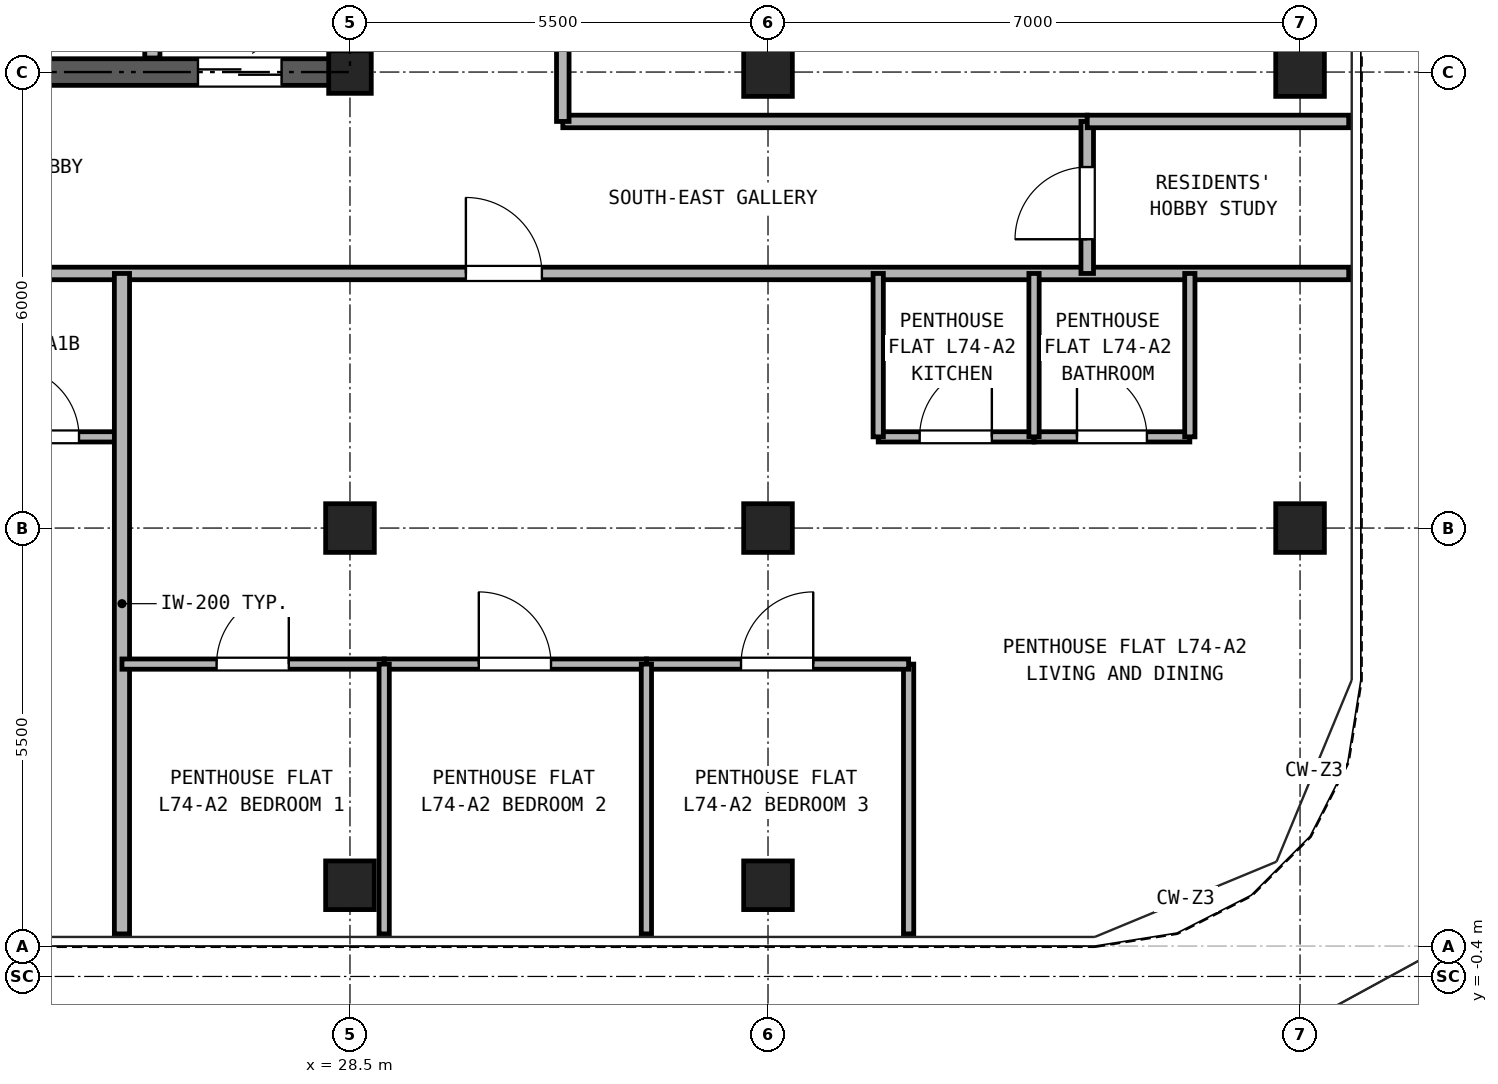
"""IFC4 building model, lengths in metres.
Left out: names, types, materials, properties, quantities, classifications, styles, units other than length and angle.
Written with IfcOpenShell. Run it as: python <this file> out.ifc"""

import sys

from ifc_helpers import new_model, si_unit, direction, frame, frame_2d, origin, origin_2d, place, context, subcontext, project, spatial, rectangle, hollow_rectangle, extrude, source, transform, mapped, element, fill, save


model = new_model("IFC4")
c1 = context("Model", 3, precision=1e-05, world=origin(), true_north=direction((0.0, 1.0)))
c2 = subcontext(c1, "Body", "Model", "MODEL_VIEW")
j1 = project(units=[si_unit("LENGTHUNIT", "METRE"), si_unit("PLANEANGLEUNIT", "RADIAN")], contexts=[c1])
p1 = place(None, origin())
s1 = spatial("IfcSite", under=j1, at=p1, CompositionType="ELEMENT")
p2 = place(p1, origin())
s2 = spatial("IfcBuilding", under=s1, at=p2, CompositionType="ELEMENT")
p3 = place(p2, frame((0.0, 0.0, 258.5)))
s3 = spatial("IfcBuildingStorey", under=s2, at=p3, CompositionType="ELEMENT", Elevation=258.5)
m1 = source(origin(), c2, "Body", "SweptSolid", [
    extrude(hollow_rectangle(XDim=0.64, YDim=0.64, WallThickness=0.035, at=origin_2d()), origin(), (0.0, 0.0, 1.0), 2.98),
])
for number, where, z_axis, x_axis in (
    (1, (28.5, 0.8, 0.0), (0.0, 0.0, 1.0), (1.0, 0.0, 0.0)),
    (2, (34.0, 0.8, 0.0), (0.0, 0.0, 1.0), (1.0, 0.0, 0.0)),
    (3, (41.0, 5.5, 0.0), (0.0, 0.0, 1.0), (1.0, 0.0, 0.0)),
    (4, (41.0, 11.5, 0.0), (0.0, 0.0, 1.0), (1.0, 0.0, 0.0)),
    (5, (28.5, 5.5, 0.0), (0.0, 0.0, 1.0), (1.0, 0.0, 0.0)),
):
    element("IfcColumn", number, at=place(p3, frame(where, z_axis=z_axis, x_axis=x_axis)), inside=s3, PredefinedType="COLUMN", context=c2, shape_type="MappedRepresentation", body=[
        mapped(m1, transform((0.0, 0.0, 0.0), x_axis=(1.0, 0.0, 0.0), y_axis=(0.0, 1.0, 0.0), z_axis=(0.0, 0.0, 1.0), scale=1.0)),
    ])
m2 = source(origin(), c2, "Body", "SweptSolid", [
    extrude(hollow_rectangle(XDim=0.56, YDim=0.56, WallThickness=0.03, at=origin_2d()), origin(), (0.0, 0.0, 1.0), 2.98),
])
p4 = place(p3, frame((28.5, 11.5, 0.0), z_axis=(0.0, 0.0, 1.0), x_axis=(1.0, 0.0, 0.0)))
e6 = element("IfcColumn", 6, at=p4, inside=s3, PredefinedType="COLUMN", context=c2, shape_type="MappedRepresentation", body=[
    mapped(m2, transform((0.0, 0.0, 0.0), x_axis=(1.0, 0.0, 0.0), y_axis=(0.0, 1.0, 0.0), z_axis=(0.0, 0.0, 1.0), scale=1.0)),
])
for number, where, z_axis, x_axis in (
    (7, (34.0, 5.5, 0.0), (0.0, 0.0, 1.0), (1.0, 0.0, 0.0)),
    (8, (34.0, 11.5, 0.0), (0.0, 0.0, 1.0), (1.0, 0.0, 0.0)),
):
    element("IfcColumn", number, at=place(p3, frame(where, z_axis=z_axis, x_axis=x_axis)), inside=s3, PredefinedType="COLUMN", context=c2, shape_type="MappedRepresentation", body=[
        mapped(m1, transform((0.0, 0.0, 0.0), x_axis=(1.0, 0.0, 0.0), y_axis=(0.0, 1.0, 0.0), z_axis=(0.0, 0.0, 1.0), scale=1.0)),
    ])
p5 = place(p3, frame((18.325, 11.5, 0.0), z_axis=(0.0, 0.0, 1.0), x_axis=(1.0, 0.0, 0.0)))
e9 = element("IfcWall", 9, at=p5, inside=s3, PredefinedType="SHEAR", context=c2, shape_type="SweptSolid", body=[
    extrude(rectangle(XDim=10.35, YDim=0.35, at=frame_2d((5.175, 0.0))), origin(), (0.0, 0.0, 1.0), 2.98),
])
p6 = place(p5, frame((1.775, 0.0, 0.0)))
e10 = element("IfcOpeningElement", 10, at=p6, cuts=e9, PredefinedType="OPENING", context=c2, shape_type="SweptSolid", body=[
    extrude(rectangle(XDim=0.95, YDim=2.15, at=frame_2d((0.475, 1.075))), frame((0.0, 0.185, 0.0), z_axis=(0.0, -1.0, 0.0), x_axis=(1.0, 0.0, 0.0)), (0.0, 0.0, 1.0), 0.37),
])
p7 = place(p5, frame((5.275, 0.0, 0.0)))
e11 = element("IfcOpeningElement", 11, at=p7, cuts=e9, PredefinedType="OPENING", context=c2, shape_type="SweptSolid", body=[
    extrude(rectangle(XDim=0.95, YDim=2.15, at=frame_2d((0.475, 1.075))), frame((0.0, 0.185, 0.0), z_axis=(0.0, -1.0, 0.0), x_axis=(1.0, 0.0, 0.0)), (0.0, 0.0, 1.0), 0.37),
])
p8 = place(p5, frame((8.175, 0.0, 0.0)))
e12 = element("IfcOpeningElement", 12, at=p8, cuts=e9, PredefinedType="OPENING", context=c2, shape_type="SweptSolid", body=[
    extrude(rectangle(XDim=1.1, YDim=2.25, at=frame_2d((0.55, 1.125))), frame((0.0, 0.185, 0.0), z_axis=(0.0, -1.0, 0.0), x_axis=(1.0, 0.0, 0.0)), (0.0, 0.0, 1.0), 0.37),
])
p9 = place(p3, frame((28.5, 11.675, 0.0), z_axis=(0.0, 0.0, 1.0), x_axis=(0.0, 1.0, 0.0)))
e13 = element("IfcWall", 13, at=p9, inside=s3, PredefinedType="SHEAR", context=c2, shape_type="SweptSolid", body=[
    extrude(rectangle(XDim=16.9, YDim=0.35, at=frame_2d((8.45, 0.0))), origin(), (0.0, 0.0, 1.0), 2.98),
])
p10 = place(p9, frame((7.475, 0.0, 0.0)))
e14 = element("IfcOpeningElement", 14, at=p10, cuts=e13, PredefinedType="OPENING", context=c2, shape_type="SweptSolid", body=[
    extrude(rectangle(XDim=1.15, YDim=2.2, at=frame_2d((0.575, 1.1))), frame((0.0, 0.185, 0.0), z_axis=(0.0, -1.0, 0.0), x_axis=(1.0, 0.0, 0.0)), (0.0, 0.0, 1.0), 0.37),
])
p11 = place(p3, frame((25.9, 11.685, 0.0), z_axis=(0.0, 0.0, 1.0), x_axis=(0.0, 1.0, 0.0)))
e15 = element("IfcWall", 15, at=p11, inside=s3, PredefinedType="PARTITIONING", context=c2, shape_type="SweptSolid", body=[
    extrude(rectangle(XDim=3.315, YDim=0.2, at=frame_2d((1.657, 0.0))), origin(), (0.0, 0.0, 1.0), 2.98),
])
p12 = place(p3, frame((5.36, 8.85, 0.0), z_axis=(0.0, 0.0, 1.0), x_axis=(1.0, 0.0, 0.0)))
e16 = element("IfcWall", 16, at=p12, inside=s3, PredefinedType="PARTITIONING", context=c2, shape_type="SweptSolid", body=[
    extrude(rectangle(XDim=36.28, YDim=0.165, at=frame_2d((18.14, 0.0))), origin(), (0.0, 0.0, 1.0), 2.98),
])
p13 = place(p12, frame((9.17, 0.0, 0.0)))
e17 = element("IfcOpeningElement", 17, at=p13, cuts=e16, PredefinedType="OPENING", context=c2, shape_type="SweptSolid", body=[
    extrude(rectangle(XDim=1.0, YDim=2.15, at=frame_2d((0.5, 1.075))), frame((0.0, 0.093, 0.0), z_axis=(0.0, -1.0, 0.0), x_axis=(1.0, 0.0, 0.0)), (0.0, 0.0, 1.0), 0.185),
])
p14 = place(p12, frame((24.665, 0.0, 0.0)))
e18 = element("IfcOpeningElement", 18, at=p14, cuts=e16, PredefinedType="OPENING", context=c2, shape_type="SweptSolid", body=[
    extrude(rectangle(XDim=1.0, YDim=2.15, at=frame_2d((0.5, 1.075))), frame((0.0, 0.093, 0.0), z_axis=(0.0, -1.0, 0.0), x_axis=(1.0, 0.0, 0.0)), (0.0, 0.0, 1.0), 0.185),
])
p15 = place(p3, frame((31.3, 10.85, 0.0), z_axis=(0.0, 0.0, 1.0), x_axis=(1.0, 0.0, 0.0)))
e19 = element("IfcWall", 19, at=p15, inside=s3, PredefinedType="PARTITIONING", context=c2, shape_type="SweptSolid", body=[
    extrude(rectangle(XDim=6.9, YDim=0.165, at=frame_2d((3.45, 0.0))), origin(), (0.0, 0.0, 1.0), 2.98),
])
p16 = place(p3, frame((38.2, 8.85, 0.0), z_axis=(0.0, 0.0, 1.0), x_axis=(0.0, 1.0, 0.0)))
e20 = element("IfcWall", 20, at=p16, inside=s3, PredefinedType="PARTITIONING", context=c2, shape_type="SweptSolid", body=[
    extrude(rectangle(XDim=2.0, YDim=0.165, at=frame_2d((1.0, 0.0))), origin(), (0.0, 0.0, 1.0), 2.98),
])
p17 = place(p16, frame((0.45, 0.0, 0.0)))
e21 = element("IfcOpeningElement", 21, at=p17, cuts=e20, PredefinedType="OPENING", context=c2, shape_type="SweptSolid", body=[
    extrude(rectangle(XDim=0.95, YDim=2.15, at=frame_2d((0.475, 1.075))), frame((0.0, 0.093, 0.0), z_axis=(0.0, -1.0, 0.0), x_axis=(1.0, 0.0, 0.0)), (0.0, 0.0, 1.0), 0.185),
])
p18 = place(p3, frame((31.3, 10.85, 0.0), z_axis=(0.0, 0.0, 1.0), x_axis=(0.0, 1.0, 0.0)))
e22 = element("IfcWall", 22, at=p18, inside=s3, PredefinedType="PARTITIONING", context=c2, shape_type="SweptSolid", body=[
    extrude(rectangle(XDim=24.29, YDim=0.165, at=frame_2d((12.145, 0.0))), origin(), (0.0, 0.0, 1.0), 2.98),
])
p19 = place(p18, frame((5.325, 0.0, 0.0)))
e23 = element("IfcOpeningElement", 23, at=p19, cuts=e22, PredefinedType="OPENING", context=c2, shape_type="SweptSolid", body=[
    extrude(rectangle(XDim=0.95, YDim=2.15, at=frame_2d((0.475, 1.075))), frame((0.0, 0.093, 0.0), z_axis=(0.0, -1.0, 0.0), x_axis=(1.0, 0.0, 0.0)), (0.0, 0.0, 1.0), 0.185),
])
p20 = place(p18, frame((14.65, 0.0, 0.0)))
e24 = element("IfcOpeningElement", 24, at=p20, cuts=e22, PredefinedType="OPENING", context=c2, shape_type="SweptSolid", body=[
    extrude(rectangle(XDim=0.95, YDim=2.15, at=frame_2d((0.475, 1.075))), frame((0.0, 0.093, 0.0), z_axis=(0.0, -1.0, 0.0), x_axis=(1.0, 0.0, 0.0)), (0.0, 0.0, 1.0), 0.185),
])
p21 = place(p18, frame((20.97, 0.0, 0.0)))
e25 = element("IfcOpeningElement", 25, at=p21, cuts=e22, PredefinedType="OPENING", context=c2, shape_type="SweptSolid", body=[
    extrude(rectangle(XDim=0.95, YDim=2.15, at=frame_2d((0.475, 1.075))), frame((0.0, 0.093, 0.0), z_axis=(0.0, -1.0, 0.0), x_axis=(1.0, 0.0, 0.0)), (0.0, 0.0, 1.0), 0.185),
])
p22 = place(p3, frame((23.45, 6.7, 0.0), z_axis=(0.0, 0.0, 1.0), x_axis=(1.0, 0.0, 0.0)))
e26 = element("IfcWall", 26, at=p22, inside=s3, PredefinedType="PARTITIONING", context=c2, shape_type="SweptSolid", body=[
    extrude(rectangle(XDim=2.05, YDim=0.135, at=frame_2d((1.025, 0.0))), origin(), (0.0, 0.0, 1.0), 2.98),
])
p23 = place(p22, frame((0.565, 0.0, 0.0)))
e27 = element("IfcOpeningElement", 27, at=p23, cuts=e26, PredefinedType="OPENING", context=c2, shape_type="SweptSolid", body=[
    extrude(rectangle(XDim=0.92, YDim=2.1, at=frame_2d((0.46, 1.05))), frame((0.0, 0.077, 0.0), z_axis=(0.0, -1.0, 0.0), x_axis=(1.0, 0.0, 0.0)), (0.0, 0.0, 1.0), 0.155),
])
p24 = place(p3, frame((25.5, 0.16, 0.0), z_axis=(0.0, 0.0, 1.0), x_axis=(0.0, 1.0, 0.0)))
e28 = element("IfcWall", 28, at=p24, inside=s3, PredefinedType="PARTITIONING", context=c2, shape_type="SweptSolid", body=[
    extrude(rectangle(XDim=8.69, YDim=0.2, at=frame_2d((4.345, 0.0))), origin(), (0.0, 0.0, 1.0), 2.98),
])
p25 = place(p3, frame((35.45, 6.7, 0.0), z_axis=(0.0, 0.0, 1.0), x_axis=(1.0, 0.0, 0.0)))
e29 = element("IfcWall", 29, at=p25, inside=s3, PredefinedType="PARTITIONING", context=c2, shape_type="SweptSolid", body=[
    extrude(rectangle(XDim=2.05, YDim=0.135, at=frame_2d((1.025, 0.0))), origin(), (0.0, 0.0, 1.0), 2.98),
])
p26 = place(p25, frame((0.545, 0.0, 0.0)))
e30 = element("IfcOpeningElement", 30, at=p26, cuts=e29, PredefinedType="OPENING", context=c2, shape_type="SweptSolid", body=[
    extrude(rectangle(XDim=0.95, YDim=2.15, at=frame_2d((0.475, 1.075))), frame((0.0, 0.077, 0.0), z_axis=(0.0, -1.0, 0.0), x_axis=(1.0, 0.0, 0.0)), (0.0, 0.0, 1.0), 0.155),
])
p27 = place(p3, frame((37.5, 6.7, 0.0), z_axis=(0.0, 0.0, 1.0), x_axis=(1.0, 0.0, 0.0)))
e31 = element("IfcWall", 31, at=p27, inside=s3, PredefinedType="PARTITIONING", context=c2, shape_type="SweptSolid", body=[
    extrude(rectangle(XDim=2.05, YDim=0.135, at=frame_2d((1.025, 0.0))), origin(), (0.0, 0.0, 1.0), 2.98),
])
p28 = place(p27, frame((0.565, 0.0, 0.0)))
e32 = element("IfcOpeningElement", 32, at=p28, cuts=e31, PredefinedType="OPENING", context=c2, shape_type="SweptSolid", body=[
    extrude(rectangle(XDim=0.92, YDim=2.1, at=frame_2d((0.46, 1.05))), frame((0.0, 0.077, 0.0), z_axis=(0.0, -1.0, 0.0), x_axis=(1.0, 0.0, 0.0)), (0.0, 0.0, 1.0), 0.155),
])
for number, where, z_axis, x_axis in (
    (33, (35.45, 6.7, 0.0), (0.0, 0.0, 1.0), (0.0, 1.0, 0.0)),
    (34, (37.5, 6.7, 0.0), (0.0, 0.0, 1.0), (0.0, 1.0, 0.0)),
    (35, (39.55, 6.7, 0.0), (0.0, 0.0, 1.0), (0.0, 1.0, 0.0)),
):
    element("IfcWall", number, at=place(p3, frame(where, z_axis=z_axis, x_axis=x_axis)), inside=s3, PredefinedType="PARTITIONING", context=c2, shape_type="SweptSolid", body=[
        extrude(rectangle(XDim=2.15, YDim=0.135, at=frame_2d((1.075, 0.0))), origin(), (0.0, 0.0, 1.0), 2.98),
    ])
p29 = place(p3, frame((35.85, 0.16, 0.0), z_axis=(0.0, 0.0, 1.0), x_axis=(0.0, 1.0, 0.0)))
e36 = element("IfcWall", 36, at=p29, inside=s3, PredefinedType="PARTITIONING", context=c2, shape_type="SweptSolid", body=[
    extrude(rectangle(XDim=3.55, YDim=0.135, at=frame_2d((1.775, 0.0))), origin(), (0.0, 0.0, 1.0), 2.98),
])
p30 = place(p3, frame((25.5, 3.71, 0.0), z_axis=(0.0, 0.0, 1.0), x_axis=(1.0, 0.0, 0.0)))
e37 = element("IfcWall", 37, at=p30, inside=s3, PredefinedType="PARTITIONING", context=c2, shape_type="SweptSolid", body=[
    extrude(rectangle(XDim=3.45, YDim=0.135, at=frame_2d((1.725, 0.0))), origin(), (0.0, 0.0, 1.0), 2.98),
])
p31 = place(p30, frame((1.245, 0.0, 0.0)))
e38 = element("IfcOpeningElement", 38, at=p31, cuts=e37, PredefinedType="OPENING", context=c2, shape_type="SweptSolid", body=[
    extrude(rectangle(XDim=0.95, YDim=2.15, at=frame_2d((0.475, 1.075))), frame((0.0, 0.077, 0.0), z_axis=(0.0, -1.0, 0.0), x_axis=(1.0, 0.0, 0.0)), (0.0, 0.0, 1.0), 0.155),
])
p32 = place(p3, frame((28.95, 3.71, 0.0), z_axis=(0.0, 0.0, 1.0), x_axis=(1.0, 0.0, 0.0)))
e39 = element("IfcWall", 39, at=p32, inside=s3, PredefinedType="PARTITIONING", context=c2, shape_type="SweptSolid", body=[
    extrude(rectangle(XDim=3.45, YDim=0.135, at=frame_2d((1.725, 0.0))), origin(), (0.0, 0.0, 1.0), 2.98),
])
p33 = place(p32, frame((1.245, 0.0, 0.0)))
e40 = element("IfcOpeningElement", 40, at=p33, cuts=e39, PredefinedType="OPENING", context=c2, shape_type="SweptSolid", body=[
    extrude(rectangle(XDim=0.95, YDim=2.15, at=frame_2d((0.475, 1.075))), frame((0.0, 0.077, 0.0), z_axis=(0.0, -1.0, 0.0), x_axis=(1.0, 0.0, 0.0)), (0.0, 0.0, 1.0), 0.155),
])
p34 = place(p3, frame((28.95, 0.16, 0.0), z_axis=(0.0, 0.0, 1.0), x_axis=(0.0, 1.0, 0.0)))
e41 = element("IfcWall", 41, at=p34, inside=s3, PredefinedType="PARTITIONING", context=c2, shape_type="SweptSolid", body=[
    extrude(rectangle(XDim=3.55, YDim=0.135, at=frame_2d((1.775, 0.0))), origin(), (0.0, 0.0, 1.0), 2.98),
])
p35 = place(p3, frame((32.4, 3.71, 0.0), z_axis=(0.0, 0.0, 1.0), x_axis=(1.0, 0.0, 0.0)))
e42 = element("IfcWall", 42, at=p35, inside=s3, PredefinedType="PARTITIONING", context=c2, shape_type="SweptSolid", body=[
    extrude(rectangle(XDim=3.45, YDim=0.135, at=frame_2d((1.725, 0.0))), origin(), (0.0, 0.0, 1.0), 2.98),
])
p36 = place(p35, frame((1.245, 0.0, 0.0)))
e43 = element("IfcOpeningElement", 43, at=p36, cuts=e42, PredefinedType="OPENING", context=c2, shape_type="SweptSolid", body=[
    extrude(rectangle(XDim=0.95, YDim=2.15, at=frame_2d((0.475, 1.075))), frame((0.0, 0.077, 0.0), z_axis=(0.0, -1.0, 0.0), x_axis=(1.0, 0.0, 0.0)), (0.0, 0.0, 1.0), 0.155),
])
p37 = place(p3, frame((32.4, 0.16, 0.0), z_axis=(0.0, 0.0, 1.0), x_axis=(0.0, 1.0, 0.0)))
e44 = element("IfcWall", 44, at=p37, inside=s3, PredefinedType="PARTITIONING", context=c2, shape_type="SweptSolid", body=[
    extrude(rectangle(XDim=3.55, YDim=0.135, at=frame_2d((1.775, 0.0))), origin(), (0.0, 0.0, 1.0), 2.98),
])
p38 = place(p3, frame((38.2, 10.85, 0.0), z_axis=(0.0, 0.0, 1.0), x_axis=(1.0, 0.0, 0.0)))
e45 = element("IfcWall", 45, at=p38, inside=s3, PredefinedType="PARTITIONING", context=c2, shape_type="SweptSolid", body=[
    extrude(rectangle(XDim=3.44, YDim=0.165, at=frame_2d((1.72, 0.0))), origin(), (0.0, 0.0, 1.0), 2.98),
])
p39 = place(p8, frame((1.1, 0.0, 0.0), z_axis=(0.0, 0.0, 1.0), x_axis=(-1.0, 0.0, 0.0)))
e46 = element("IfcDoor", 46, at=p39, inside=s3, OperationType="DOUBLE_DOOR_SLIDING", PredefinedType="DOOR", context=c2, shape_type="SweptSolid", body=[
    extrude(rectangle(XDim=1.1, YDim=2.25, at=frame_2d((0.55, 1.125))), frame((0.0, 0.025, 0.0), z_axis=(0.0, -1.0, 0.0), x_axis=(1.0, 0.0, 0.0)), (0.0, 0.0, 1.0), 0.05),
])
fill(e12, e46)
p40 = place(p23, origin())
e47 = element("IfcDoor", 47, at=p40, inside=s3, OperationType="SINGLE_SWING_LEFT", PredefinedType="DOOR", context=c2, shape_type="SweptSolid", body=[
    extrude(rectangle(XDim=0.92, YDim=2.1, at=frame_2d((0.46, 1.05))), frame((0.0, 0.025, 0.0), z_axis=(0.0, -1.0, 0.0), x_axis=(1.0, 0.0, 0.0)), (0.0, 0.0, 1.0), 0.05),
])
fill(e27, e47)
p41 = place(p26, origin())
e48 = element("IfcDoor", 48, at=p41, inside=s3, OperationType="SINGLE_SWING_RIGHT", PredefinedType="DOOR", context=c2, shape_type="SweptSolid", body=[
    extrude(rectangle(XDim=0.95, YDim=2.15, at=frame_2d((0.475, 1.075))), frame((0.0, 0.025, 0.0), z_axis=(0.0, -1.0, 0.0), x_axis=(1.0, 0.0, 0.0)), (0.0, 0.0, 1.0), 0.05),
])
fill(e30, e48)
p42 = place(p28, origin())
e49 = element("IfcDoor", 49, at=p42, inside=s3, OperationType="SINGLE_SWING_LEFT", PredefinedType="DOOR", context=c2, shape_type="SweptSolid", body=[
    extrude(rectangle(XDim=0.92, YDim=2.1, at=frame_2d((0.46, 1.05))), frame((0.0, 0.025, 0.0), z_axis=(0.0, -1.0, 0.0), x_axis=(1.0, 0.0, 0.0)), (0.0, 0.0, 1.0), 0.05),
])
fill(e32, e49)
p43 = place(p31, frame((0.95, 0.0, 0.0), z_axis=(0.0, 0.0, 1.0), x_axis=(-1.0, 0.0, 0.0)))
e50 = element("IfcDoor", 50, at=p43, inside=s3, OperationType="SINGLE_SWING_RIGHT", PredefinedType="DOOR", context=c2, shape_type="SweptSolid", body=[
    extrude(rectangle(XDim=0.95, YDim=2.15, at=frame_2d((0.475, 1.075))), frame((0.0, 0.025, 0.0), z_axis=(0.0, -1.0, 0.0), x_axis=(1.0, 0.0, 0.0)), (0.0, 0.0, 1.0), 0.05),
])
fill(e38, e50)
p44 = place(p33, frame((0.95, 0.0, 0.0), z_axis=(0.0, 0.0, 1.0), x_axis=(-1.0, 0.0, 0.0)))
e51 = element("IfcDoor", 51, at=p44, inside=s3, OperationType="SINGLE_SWING_LEFT", PredefinedType="DOOR", context=c2, shape_type="SweptSolid", body=[
    extrude(rectangle(XDim=0.95, YDim=2.15, at=frame_2d((0.475, 1.075))), frame((0.0, 0.025, 0.0), z_axis=(0.0, -1.0, 0.0), x_axis=(1.0, 0.0, 0.0)), (0.0, 0.0, 1.0), 0.05),
])
fill(e40, e51)
p45 = place(p36, frame((0.95, 0.0, 0.0), z_axis=(0.0, 0.0, 1.0), x_axis=(-1.0, 0.0, 0.0)))
e52 = element("IfcDoor", 52, at=p45, inside=s3, OperationType="SINGLE_SWING_RIGHT", PredefinedType="DOOR", context=c2, shape_type="SweptSolid", body=[
    extrude(rectangle(XDim=0.95, YDim=2.15, at=frame_2d((0.475, 1.075))), frame((0.0, 0.025, 0.0), z_axis=(0.0, -1.0, 0.0), x_axis=(1.0, 0.0, 0.0)), (0.0, 0.0, 1.0), 0.05),
])
fill(e43, e52)
p46 = place(p14, frame((1.0, 0.0, 0.0), z_axis=(0.0, 0.0, 1.0), x_axis=(-1.0, 0.0, 0.0)))
e53 = element("IfcDoor", 53, at=p46, inside=s3, OperationType="SINGLE_SWING_LEFT", PredefinedType="DOOR", context=c2, shape_type="SweptSolid", body=[
    extrude(rectangle(XDim=1.0, YDim=2.15, at=frame_2d((0.5, 1.075))), frame((0.0, 0.025, 0.0), z_axis=(0.0, -1.0, 0.0), x_axis=(1.0, 0.0, 0.0)), (0.0, 0.0, 1.0), 0.05),
])
fill(e18, e53)
p47 = place(p17, origin())
e54 = element("IfcDoor", 54, at=p47, inside=s3, OperationType="SINGLE_SWING_LEFT", PredefinedType="DOOR", context=c2, shape_type="SweptSolid", body=[
    extrude(rectangle(XDim=0.95, YDim=2.15, at=frame_2d((0.475, 1.075))), frame((0.0, 0.025, 0.0), z_axis=(0.0, -1.0, 0.0), x_axis=(1.0, 0.0, 0.0)), (0.0, 0.0, 1.0), 0.05),
])
fill(e21, e54)
save(model, sys.argv[1])
